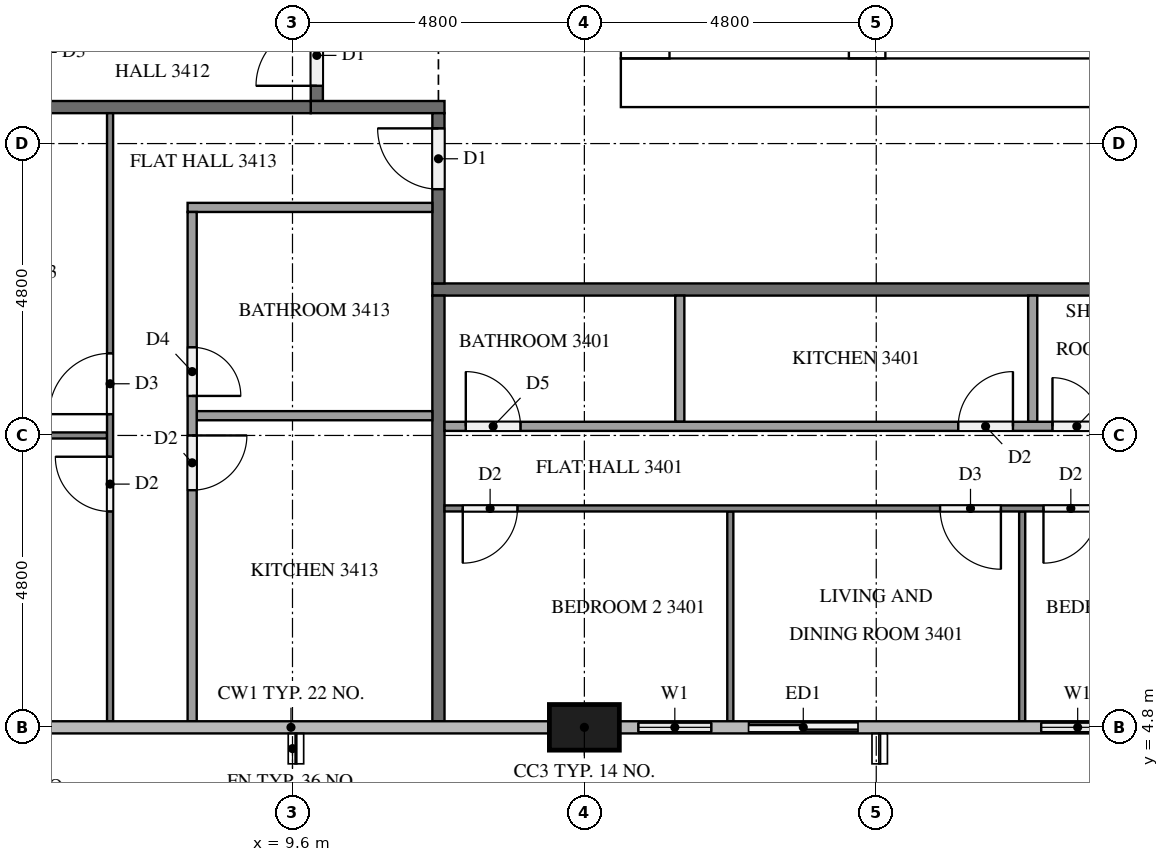
"""IFC4 building model, lengths in metres.
Left out: names, types, materials, properties, quantities, classifications, styles, units other than length and angle.
Written with IfcOpenShell. Run it as: python <this file> out.ifc"""

import sys

from ifc_helpers import new_model, si_unit, direction, frame, frame_2d, origin, origin_2d, place, context, subcontext, project, spatial, rectangle, extrude, element, fill, save


model = new_model("IFC4")
c1 = context("Model", 3, precision=1e-05, world=origin(), true_north=direction((0.0, 1.0)))
c2 = subcontext(c1, "Body", "Model", "MODEL_VIEW")
j1 = project(units=[si_unit("LENGTHUNIT", "METRE"), si_unit("PLANEANGLEUNIT", "RADIAN")], contexts=[c1])
p1 = place(None, origin())
s1 = spatial("IfcSite", under=j1, at=p1, CompositionType="ELEMENT")
p2 = place(p1, origin())
s2 = spatial("IfcBuilding", under=s1, at=p2, CompositionType="ELEMENT")
p3 = place(p2, frame((0.0, 0.0, 133.1)))
s3 = spatial("IfcBuildingStorey", under=s2, at=p3, CompositionType="ELEMENT", Elevation=133.1)
p4 = place(p3, frame((15.0, 15.4, 0.0), z_axis=(0.0, 0.0, 1.0), x_axis=(1.0, 0.0, 0.0)))
e1 = element("IfcWall", 1, at=p4, inside=s3, PredefinedType="SHEAR", context=c2, shape_type="SweptSolid", body=[
    extrude(rectangle(XDim=32.4, YDim=0.8, at=frame_2d((16.2, 0.0))), origin(), (0.0, 0.0, 1.0), 3.2),
])
p5 = place(p4, frame((15.3, 0.0, 0.0)))
e2 = element("IfcOpeningElement", 2, at=p5, cuts=e1, PredefinedType="OPENING", context=c2, shape_type="SweptSolid", body=[
    extrude(rectangle(XDim=1.8, YDim=2.1, at=frame_2d((0.9, 1.05))), frame((0.0, 0.41, 0.0), z_axis=(0.0, -1.0, 0.0), x_axis=(1.0, 0.0, 0.0)), (0.0, 0.0, 1.0), 0.82),
])
p6 = place(p3, frame((15.4, 15.8, 0.0), z_axis=(0.0, 0.0, 1.0), x_axis=(0.0, 1.0, 0.0)))
e3 = element("IfcWall", 3, at=p6, inside=s3, PredefinedType="SHEAR", context=c2, shape_type="SweptSolid", body=[
    extrude(rectangle(XDim=21.2, YDim=0.8, at=frame_2d((10.6, 0.0))), origin(), (0.0, 0.0, 1.0), 3.2),
])
p7 = place(p6, frame((4.96, 0.0, 0.0)))
e4 = element("IfcOpeningElement", 4, at=p7, cuts=e3, PredefinedType="OPENING", context=c2, shape_type="SweptSolid", body=[
    extrude(rectangle(XDim=1.2, YDim=2.1, at=frame_2d((0.6, 1.05))), frame((0.0, 0.41, 0.0), z_axis=(0.0, -1.0, 0.0), x_axis=(1.0, 0.0, 0.0)), (0.0, 0.0, 1.0), 0.82),
])
p8 = place(p3, frame((19.05, 15.8, 0.0), z_axis=(0.0, 0.0, 1.0), x_axis=(0.0, 1.0, 0.0)))
e5 = element("IfcWall", 5, at=p8, inside=s3, PredefinedType="SHEAR", context=c2, shape_type="SweptSolid", body=[
    extrude(rectangle(XDim=15.15, YDim=0.6, at=frame_2d((7.575, 0.0))), origin(), (0.0, 0.0, 1.0), 3.2),
])
p9 = place(p8, frame((9.65, 0.0, 0.0)))
e6 = element("IfcOpeningElement", 6, at=p9, cuts=e5, PredefinedType="OPENING", context=c2, shape_type="SweptSolid", body=[
    extrude(rectangle(XDim=1.1, YDim=2.1, at=frame_2d((0.55, 1.05))), frame((0.0, 0.31, 0.0), z_axis=(0.0, -1.0, 0.0), x_axis=(1.0, 0.0, 0.0)), (0.0, 0.0, 1.0), 0.62),
])
p10 = place(p8, frame((13.15, 0.0, 0.0)))
e7 = element("IfcOpeningElement", 7, at=p10, cuts=e5, PredefinedType="OPENING", context=c2, shape_type="SweptSolid", body=[
    extrude(rectangle(XDim=1.1, YDim=2.1, at=frame_2d((0.55, 1.05))), frame((0.0, 0.31, 0.0), z_axis=(0.0, -1.0, 0.0), x_axis=(1.0, 0.0, 0.0)), (0.0, 0.0, 1.0), 0.62),
])
p11 = place(p8, frame((0.4, 0.0, 0.0)))
e8 = element("IfcOpeningElement", 8, at=p11, cuts=e5, PredefinedType="OPENING", context=c2, shape_type="SweptSolid", body=[
    extrude(rectangle(XDim=1.2, YDim=2.1, at=frame_2d((0.6, 1.05))), frame((0.0, 0.31, 0.0), z_axis=(0.0, -1.0, 0.0), x_axis=(1.0, 0.0, 0.0)), (0.0, 0.0, 1.0), 0.62),
])
p12 = place(p3, frame((14.4, 4.8, 0.0), z_axis=(0.0, 0.0, 1.0), x_axis=(1.0, 0.0, 0.0)))
e9 = element("IfcColumn", 9, at=p12, inside=s3, PredefinedType="COLUMN", context=c2, shape_type="SweptSolid", body=[
    extrude(rectangle(XDim=1.15, YDim=0.75, at=origin_2d()), origin(), (0.0, 0.0, 1.0), 3.2),
])
p13 = place(p3, frame((14.975, 4.8, 0.0), z_axis=(0.0, 0.0, 1.0), x_axis=(1.0, 0.0, 0.0)))
e10 = element("IfcWall", 10, at=p13, inside=s3, PredefinedType="SOLIDWALL", context=c2, shape_type="SweptSolid", body=[
    extrude(rectangle(XDim=4.225, YDim=0.15, at=frame_2d((2.112, 0.0))), origin(), (0.0, 0.0, 1.0), 3.2),
])
p14 = place(p13, frame((0.312, 0.0, 0.9)))
e11 = element("IfcOpeningElement", 11, at=p14, cuts=e10, PredefinedType="OPENING", context=c2, shape_type="SweptSolid", body=[
    extrude(rectangle(XDim=1.2, YDim=1.4, at=frame_2d((0.6, 0.7))), frame((0.0, 0.085, 0.0), z_axis=(0.0, -1.0, 0.0), x_axis=(1.0, 0.0, 0.0)), (0.0, 0.0, 1.0), 0.17),
])
p15 = place(p13, frame((2.125, 0.0, 0.0)))
e12 = element("IfcOpeningElement", 12, at=p15, cuts=e10, PredefinedType="OPENING", context=c2, shape_type="SweptSolid", body=[
    extrude(rectangle(XDim=1.8, YDim=2.4, at=frame_2d((0.9, 1.2))), frame((0.0, 0.085, 0.0), z_axis=(0.0, -1.0, 0.0), x_axis=(1.0, 0.0, 0.0)), (0.0, 0.0, 1.0), 0.17),
])
p16 = place(p3, frame((21.6, 4.8, 0.0), z_axis=(0.0, 0.0, 1.0), x_axis=(1.0, 0.0, 0.0)))
e13 = element("IfcWall", 13, at=p16, inside=s3, PredefinedType="SOLIDWALL", context=c2, shape_type="SweptSolid", body=[
    extrude(rectangle(XDim=1.825, YDim=0.15, at=frame_2d((0.913, 0.0))), origin(), (0.0, 0.0, 1.0), 3.2),
])
p17 = place(p16, frame((0.312, 0.0, 0.9)))
e14 = element("IfcOpeningElement", 14, at=p17, cuts=e13, PredefinedType="OPENING", context=c2, shape_type="SweptSolid", body=[
    extrude(rectangle(XDim=1.2, YDim=1.4, at=frame_2d((0.6, 0.7))), frame((0.0, 0.085, 0.0), z_axis=(0.0, -1.0, 0.0), x_axis=(1.0, 0.0, 0.0)), (0.0, 0.0, 1.0), 0.17),
])
p18 = place(p3, frame((50.5, 12.0, 0.0), z_axis=(0.0, 0.0, 1.0), x_axis=(-1.0, 0.0, 0.0)))
e15 = element("IfcWall", 15, at=p18, inside=s3, PredefinedType="PARTITIONING", context=c2, shape_type="SweptSolid", body=[
    extrude(rectangle(XDim=38.6, YDim=0.2, at=frame_2d((19.3, 0.0))), origin(), (0.0, 0.0, 1.0), 3.2),
])
p19 = place(p18, frame((24.45, 0.0, 0.0)))
e16 = element("IfcOpeningElement", 16, at=p19, cuts=e15, PredefinedType="OPENING", context=c2, shape_type="SweptSolid", body=[
    extrude(rectangle(XDim=1.0, YDim=2.1, at=frame_2d((0.5, 1.05))), frame((0.0, 0.11, 0.0), z_axis=(0.0, -1.0, 0.0), x_axis=(1.0, 0.0, 0.0)), (0.0, 0.0, 1.0), 0.22),
])
p20 = place(p18, frame((10.05, 0.0, 0.0)))
e17 = element("IfcOpeningElement", 17, at=p20, cuts=e15, PredefinedType="OPENING", context=c2, shape_type="SweptSolid", body=[
    extrude(rectangle(XDim=1.0, YDim=2.1, at=frame_2d((0.5, 1.05))), frame((0.0, 0.11, 0.0), z_axis=(0.0, -1.0, 0.0), x_axis=(1.0, 0.0, 0.0)), (0.0, 0.0, 1.0), 0.22),
])
p21 = place(p18, frame((8.35, 0.0, 0.0)))
e18 = element("IfcOpeningElement", 18, at=p21, cuts=e15, PredefinedType="OPENING", context=c2, shape_type="SweptSolid", body=[
    extrude(rectangle(XDim=1.0, YDim=2.1, at=frame_2d((0.5, 1.05))), frame((0.0, 0.11, 0.0), z_axis=(0.0, -1.0, 0.0), x_axis=(1.0, 0.0, 0.0)), (0.0, 0.0, 1.0), 0.22),
])
p22 = place(p3, frame((10.0, 15.1, 0.0), z_axis=(0.0, 0.0, 1.0), x_axis=(0.0, 1.0, 0.0)))
e19 = element("IfcWall", 19, at=p22, inside=s3, PredefinedType="PARTITIONING", context=c2, shape_type="SweptSolid", body=[
    extrude(rectangle(XDim=22.6, YDim=0.2, at=frame_2d((11.3, 0.0))), origin(), (0.0, 0.0, 1.0), 3.2),
])
p23 = place(p22, frame((16.45, 0.0, 0.0)))
e20 = element("IfcOpeningElement", 20, at=p23, cuts=e19, PredefinedType="OPENING", context=c2, shape_type="SweptSolid", body=[
    extrude(rectangle(XDim=1.0, YDim=2.1, at=frame_2d((0.5, 1.05))), frame((0.0, 0.11, 0.0), z_axis=(0.0, -1.0, 0.0), x_axis=(1.0, 0.0, 0.0)), (0.0, 0.0, 1.0), 0.22),
])
p24 = place(p22, frame((0.25, 0.0, 0.0)))
e21 = element("IfcOpeningElement", 21, at=p24, cuts=e19, PredefinedType="OPENING", context=c2, shape_type="SweptSolid", body=[
    extrude(rectangle(XDim=1.0, YDim=2.1, at=frame_2d((0.5, 1.05))), frame((0.0, 0.11, 0.0), z_axis=(0.0, -1.0, 0.0), x_axis=(1.0, 0.0, 0.0)), (0.0, 0.0, 1.0), 0.22),
])
p25 = place(p3, frame((9.9, 15.0, 0.0), z_axis=(0.0, 0.0, 1.0), x_axis=(1.0, 0.0, 0.0)))
e22 = element("IfcWall", 22, at=p25, inside=s3, PredefinedType="PARTITIONING", context=c2, shape_type="SweptSolid", body=[
    extrude(rectangle(XDim=2.2, YDim=0.2, at=frame_2d((1.1, 0.0))), origin(), (0.0, 0.0, 1.0), 3.2),
])
p26 = place(p3, frame((12.0, 12.1, 0.0), z_axis=(0.0, 0.0, 1.0), x_axis=(0.0, 1.0, 0.0)))
e23 = element("IfcWall", 23, at=p26, inside=s3, PredefinedType="PARTITIONING", context=c2, shape_type="SweptSolid", body=[
    extrude(rectangle(XDim=2.8, YDim=0.2, at=frame_2d((1.4, 0.0))), origin(), (0.0, 0.0, 1.0), 3.2),
])
p27 = place(p26, frame((1.55, 0.0, 0.0)))
e24 = element("IfcOpeningElement", 24, at=p27, cuts=e23, PredefinedType="OPENING", context=c2, shape_type="SweptSolid", body=[
    extrude(rectangle(XDim=1.0, YDim=2.1, at=frame_2d((0.5, 1.05))), frame((0.0, 0.11, 0.0), z_axis=(0.0, -1.0, 0.0), x_axis=(1.0, 0.0, 0.0)), (0.0, 0.0, 1.0), 0.22),
])
p28 = place(p3, frame((12.0, 4.9, 0.0), z_axis=(0.0, 0.0, 1.0), x_axis=(0.0, 1.0, 0.0)))
e25 = element("IfcWall", 25, at=p28, inside=s3, PredefinedType="PARTITIONING", context=c2, shape_type="SweptSolid", body=[
    extrude(rectangle(XDim=7.0, YDim=0.2, at=frame_2d((3.5, 0.0))), origin(), (0.0, 0.0, 1.0), 3.2),
])
p29 = place(p3, frame((0.1, 15.0, 0.0), z_axis=(0.0, 0.0, 1.0), x_axis=(1.0, 0.0, 0.0)))
e26 = element("IfcWall", 26, at=p29, inside=s3, PredefinedType="PARTITIONING", context=c2, shape_type="SweptSolid", body=[
    extrude(rectangle(XDim=9.8, YDim=0.2, at=frame_2d((4.9, 0.0))), origin(), (0.0, 0.0, 1.0), 3.2),
])
for number, where, z_axis, x_axis in (
    (27, (21.6, 8.35, 0.0), (0.0, 0.0, 1.0), (0.0, -1.0, 0.0)),
    (28, (16.8, 8.35, 0.0), (0.0, 0.0, 1.0), (0.0, -1.0, 0.0)),
):
    element("IfcWall", number, at=place(p3, frame(where, z_axis=z_axis, x_axis=x_axis)), inside=s3, PredefinedType="PARTITIONING", context=c2, shape_type="SweptSolid", body=[
        extrude(rectangle(XDim=3.45, YDim=0.1, at=frame_2d((1.725, 0.0))), origin(), (0.0, 0.0, 1.0), 3.2),
    ])
p30 = place(p3, frame((26.3, 8.4, 0.0), z_axis=(0.0, 0.0, 1.0), x_axis=(-1.0, 0.0, 0.0)))
e29 = element("IfcWall", 29, at=p30, inside=s3, PredefinedType="PARTITIONING", context=c2, shape_type="SweptSolid", body=[
    extrude(rectangle(XDim=14.2, YDim=0.1, at=frame_2d((7.1, 0.0))), origin(), (0.0, 0.0, 1.0), 3.2),
])
p31 = place(p30, frame((3.45, 0.0, 0.0)))
e30 = element("IfcOpeningElement", 30, at=p31, cuts=e29, PredefinedType="OPENING", context=c2, shape_type="SweptSolid", body=[
    extrude(rectangle(XDim=0.9, YDim=2.1, at=frame_2d((0.45, 1.05))), frame((0.0, 0.06, 0.0), z_axis=(0.0, -1.0, 0.0), x_axis=(1.0, 0.0, 0.0)), (0.0, 0.0, 1.0), 0.12),
])
p32 = place(p30, frame((5.05, 0.0, 0.0)))
e31 = element("IfcOpeningElement", 31, at=p32, cuts=e29, PredefinedType="OPENING", context=c2, shape_type="SweptSolid", body=[
    extrude(rectangle(XDim=1.0, YDim=2.1, at=frame_2d((0.5, 1.05))), frame((0.0, 0.06, 0.0), z_axis=(0.0, -1.0, 0.0), x_axis=(1.0, 0.0, 0.0)), (0.0, 0.0, 1.0), 0.12),
])
p33 = place(p30, frame((13.0, 0.0, 0.0)))
e32 = element("IfcOpeningElement", 32, at=p33, cuts=e29, PredefinedType="OPENING", context=c2, shape_type="SweptSolid", body=[
    extrude(rectangle(XDim=0.9, YDim=2.1, at=frame_2d((0.45, 1.05))), frame((0.0, 0.06, 0.0), z_axis=(0.0, -1.0, 0.0), x_axis=(1.0, 0.0, 0.0)), (0.0, 0.0, 1.0), 0.12),
])
for number, where, z_axis, x_axis in (
    (33, (21.773, 11.9, 0.0), (0.0, 0.0, 1.0), (0.0, -1.0, 0.0)),
    (34, (15.969, 11.9, 0.0), (0.0, 0.0, 1.0), (0.0, -1.0, 0.0)),
):
    element("IfcWall", number, at=place(p3, frame(where, z_axis=z_axis, x_axis=x_axis)), inside=s3, PredefinedType="PARTITIONING", context=c2, shape_type="SweptSolid", body=[
        extrude(rectangle(XDim=2.075, YDim=0.15, at=frame_2d((1.038, 0.0))), origin(), (0.0, 0.0, 1.0), 3.2),
    ])
p34 = place(p3, frame((12.1, 9.75, 0.0), z_axis=(0.0, 0.0, 1.0), x_axis=(1.0, 0.0, 0.0)))
e35 = element("IfcWall", 35, at=p34, inside=s3, PredefinedType="PARTITIONING", context=c2, shape_type="SweptSolid", body=[
    extrude(rectangle(XDim=12.575, YDim=0.15, at=frame_2d((6.288, 0.0))), origin(), (0.0, 0.0, 1.0), 3.2),
])
p35 = place(p34, frame((9.998, 0.0, 0.0)))
e36 = element("IfcOpeningElement", 36, at=p35, cuts=e35, PredefinedType="OPENING", context=c2, shape_type="SweptSolid", body=[
    extrude(rectangle(XDim=0.8, YDim=2.1, at=frame_2d((0.4, 1.05))), frame((0.0, 0.085, 0.0), z_axis=(0.0, -1.0, 0.0), x_axis=(1.0, 0.0, 0.0)), (0.0, 0.0, 1.0), 0.17),
])
p36 = place(p34, frame((8.448, 0.0, 0.0)))
e37 = element("IfcOpeningElement", 37, at=p36, cuts=e35, PredefinedType="OPENING", context=c2, shape_type="SweptSolid", body=[
    extrude(rectangle(XDim=0.9, YDim=2.1, at=frame_2d((0.45, 1.05))), frame((0.0, 0.085, 0.0), z_axis=(0.0, -1.0, 0.0), x_axis=(1.0, 0.0, 0.0)), (0.0, 0.0, 1.0), 0.17),
])
p37 = place(p34, frame((0.35, 0.0, 0.0)))
e38 = element("IfcOpeningElement", 38, at=p37, cuts=e35, PredefinedType="OPENING", context=c2, shape_type="SweptSolid", body=[
    extrude(rectangle(XDim=0.9, YDim=2.1, at=frame_2d((0.45, 1.05))), frame((0.0, 0.085, 0.0), z_axis=(0.0, -1.0, 0.0), x_axis=(1.0, 0.0, 0.0)), (0.0, 0.0, 1.0), 0.17),
])
p38 = place(p3, frame((6.55, 9.6, 0.0), z_axis=(0.0, 0.0, 1.0), x_axis=(-1.0, 0.0, 0.0)))
e39 = element("IfcWall", 39, at=p38, inside=s3, PredefinedType="PARTITIONING", context=c2, shape_type="SweptSolid", body=[
    extrude(rectangle(XDim=6.025, YDim=0.1, at=frame_2d((3.013, 0.0))), origin(), (0.0, 0.0, 1.0), 3.2),
])
p39 = place(p3, frame((6.6, 4.9, 0.0), z_axis=(0.0, 0.0, 1.0), x_axis=(0.0, 1.0, 0.0)))
e40 = element("IfcWall", 40, at=p39, inside=s3, PredefinedType="PARTITIONING", context=c2, shape_type="SweptSolid", body=[
    extrude(rectangle(XDim=10.0, YDim=0.1, at=frame_2d((5.0, 0.0))), origin(), (0.0, 0.0, 1.0), 3.2),
])
p40 = place(p39, frame((5.05, 0.0, 0.0)))
e41 = element("IfcOpeningElement", 41, at=p40, cuts=e40, PredefinedType="OPENING", context=c2, shape_type="SweptSolid", body=[
    extrude(rectangle(XDim=1.0, YDim=2.1, at=frame_2d((0.5, 1.05))), frame((0.0, 0.06, 0.0), z_axis=(0.0, -1.0, 0.0), x_axis=(1.0, 0.0, 0.0)), (0.0, 0.0, 1.0), 0.12),
])
p41 = place(p39, frame((3.45, 0.0, 0.0)))
e42 = element("IfcOpeningElement", 42, at=p41, cuts=e40, PredefinedType="OPENING", context=c2, shape_type="SweptSolid", body=[
    extrude(rectangle(XDim=0.9, YDim=2.1, at=frame_2d((0.45, 1.05))), frame((0.0, 0.06, 0.0), z_axis=(0.0, -1.0, 0.0), x_axis=(1.0, 0.0, 0.0)), (0.0, 0.0, 1.0), 0.12),
])
p42 = place(p3, frame((11.9, 9.925, 0.0), z_axis=(0.0, 0.0, 1.0), x_axis=(-1.0, 0.0, 0.0)))
e43 = element("IfcWall", 43, at=p42, inside=s3, PredefinedType="PARTITIONING", context=c2, shape_type="SweptSolid", body=[
    extrude(rectangle(XDim=3.875, YDim=0.15, at=frame_2d((1.938, 0.0))), origin(), (0.0, 0.0, 1.0), 3.2),
])
p43 = place(p3, frame((11.9, 13.35, 0.0), z_axis=(0.0, 0.0, 1.0), x_axis=(-1.0, 0.0, 0.0)))
e44 = element("IfcWall", 44, at=p43, inside=s3, PredefinedType="PARTITIONING", context=c2, shape_type="SweptSolid", body=[
    extrude(rectangle(XDim=4.025, YDim=0.15, at=frame_2d((2.012, 0.0))), origin(), (0.0, 0.0, 1.0), 3.2),
])
p44 = place(p3, frame((7.95, 13.275, 0.0), z_axis=(0.0, 0.0, 1.0), x_axis=(0.0, -1.0, 0.0)))
e45 = element("IfcWall", 45, at=p44, inside=s3, PredefinedType="PARTITIONING", context=c2, shape_type="SweptSolid", body=[
    extrude(rectangle(XDim=8.375, YDim=0.15, at=frame_2d((4.188, 0.0))), origin(), (0.0, 0.0, 1.0), 3.2),
])
p45 = place(p44, frame((2.225, 0.0, 0.0)))
e46 = element("IfcOpeningElement", 46, at=p45, cuts=e45, PredefinedType="OPENING", context=c2, shape_type="SweptSolid", body=[
    extrude(rectangle(XDim=0.8, YDim=2.1, at=frame_2d((0.4, 1.05))), frame((0.0, 0.085, 0.0), z_axis=(0.0, -1.0, 0.0), x_axis=(1.0, 0.0, 0.0)), (0.0, 0.0, 1.0), 0.17),
])
p46 = place(p44, frame((3.675, 0.0, 0.0)))
e47 = element("IfcOpeningElement", 47, at=p46, cuts=e45, PredefinedType="OPENING", context=c2, shape_type="SweptSolid", body=[
    extrude(rectangle(XDim=0.9, YDim=2.1, at=frame_2d((0.45, 1.05))), frame((0.0, 0.085, 0.0), z_axis=(0.0, -1.0, 0.0), x_axis=(1.0, 0.0, 0.0)), (0.0, 0.0, 1.0), 0.17),
])
p47 = place(p14, origin())
e48 = element("IfcWindow", 48, at=p47, inside=s3, PartitioningType="SINGLE_PANEL", PredefinedType="WINDOW", context=c2, shape_type="SweptSolid", body=[
    extrude(rectangle(XDim=1.2, YDim=1.4, at=frame_2d((0.6, 0.7))), frame((0.0, 0.03, 0.0), z_axis=(0.0, -1.0, 0.0), x_axis=(1.0, 0.0, 0.0)), (0.0, 0.0, 1.0), 0.06),
])
fill(e11, e48)
p48 = place(p15, origin())
e49 = element("IfcDoor", 49, at=p48, inside=s3, OperationType="SLIDING_TO_LEFT", PredefinedType="DOOR", context=c2, shape_type="SweptSolid", body=[
    extrude(rectangle(XDim=1.8, YDim=2.4, at=frame_2d((0.9, 1.2))), frame((0.0, 0.025, 0.0), z_axis=(0.0, -1.0, 0.0), x_axis=(1.0, 0.0, 0.0)), (0.0, 0.0, 1.0), 0.05),
])
fill(e12, e49)
p49 = place(p17, origin())
e50 = element("IfcWindow", 50, at=p49, inside=s3, PartitioningType="SINGLE_PANEL", PredefinedType="WINDOW", context=c2, shape_type="SweptSolid", body=[
    extrude(rectangle(XDim=1.2, YDim=1.4, at=frame_2d((0.6, 0.7))), frame((0.0, 0.03, 0.0), z_axis=(0.0, -1.0, 0.0), x_axis=(1.0, 0.0, 0.0)), (0.0, 0.0, 1.0), 0.06),
])
fill(e14, e50)
p50 = place(p24, origin())
e51 = element("IfcDoor", 51, at=p50, inside=s3, OperationType="SINGLE_SWING_LEFT", PredefinedType="DOOR", context=c2, shape_type="SweptSolid", body=[
    extrude(rectangle(XDim=1.0, YDim=2.1, at=frame_2d((0.5, 1.05))), frame((0.0, 0.025, 0.0), z_axis=(0.0, -1.0, 0.0), x_axis=(1.0, 0.0, 0.0)), (0.0, 0.0, 1.0), 0.05),
])
fill(e21, e51)
p51 = place(p27, origin())
e52 = element("IfcDoor", 52, at=p51, inside=s3, OperationType="SINGLE_SWING_RIGHT", PredefinedType="DOOR", context=c2, shape_type="SweptSolid", body=[
    extrude(rectangle(XDim=1.0, YDim=2.1, at=frame_2d((0.5, 1.05))), frame((0.0, 0.025, 0.0), z_axis=(0.0, -1.0, 0.0), x_axis=(1.0, 0.0, 0.0)), (0.0, 0.0, 1.0), 0.05),
])
fill(e24, e52)
p52 = place(p31, origin())
e53 = element("IfcDoor", 53, at=p52, inside=s3, OperationType="SINGLE_SWING_RIGHT", PredefinedType="DOOR", context=c2, shape_type="SweptSolid", body=[
    extrude(rectangle(XDim=0.9, YDim=2.1, at=frame_2d((0.45, 1.05))), frame((0.0, 0.025, 0.0), z_axis=(0.0, -1.0, 0.0), x_axis=(1.0, 0.0, 0.0)), (0.0, 0.0, 1.0), 0.05),
])
fill(e30, e53)
p53 = place(p32, origin())
e54 = element("IfcDoor", 54, at=p53, inside=s3, OperationType="SINGLE_SWING_LEFT", PredefinedType="DOOR", context=c2, shape_type="SweptSolid", body=[
    extrude(rectangle(XDim=1.0, YDim=2.1, at=frame_2d((0.5, 1.05))), frame((0.0, 0.025, 0.0), z_axis=(0.0, -1.0, 0.0), x_axis=(1.0, 0.0, 0.0)), (0.0, 0.0, 1.0), 0.05),
])
fill(e31, e54)
p54 = place(p33, origin())
e55 = element("IfcDoor", 55, at=p54, inside=s3, OperationType="SINGLE_SWING_RIGHT", PredefinedType="DOOR", context=c2, shape_type="SweptSolid", body=[
    extrude(rectangle(XDim=0.9, YDim=2.1, at=frame_2d((0.45, 1.05))), frame((0.0, 0.025, 0.0), z_axis=(0.0, -1.0, 0.0), x_axis=(1.0, 0.0, 0.0)), (0.0, 0.0, 1.0), 0.05),
])
fill(e32, e55)
p55 = place(p35, origin())
e56 = element("IfcDoor", 56, at=p55, inside=s3, OperationType="SINGLE_SWING_LEFT", PredefinedType="DOOR", context=c2, shape_type="SweptSolid", body=[
    extrude(rectangle(XDim=0.8, YDim=2.1, at=frame_2d((0.4, 1.05))), frame((0.0, 0.025, 0.0), z_axis=(0.0, -1.0, 0.0), x_axis=(1.0, 0.0, 0.0)), (0.0, 0.0, 1.0), 0.05),
])
fill(e36, e56)
p56 = place(p36, origin())
e57 = element("IfcDoor", 57, at=p56, inside=s3, OperationType="SINGLE_SWING_RIGHT", PredefinedType="DOOR", context=c2, shape_type="SweptSolid", body=[
    extrude(rectangle(XDim=0.9, YDim=2.1, at=frame_2d((0.45, 1.05))), frame((0.0, 0.025, 0.0), z_axis=(0.0, -1.0, 0.0), x_axis=(1.0, 0.0, 0.0)), (0.0, 0.0, 1.0), 0.05),
])
fill(e37, e57)
p57 = place(p37, origin())
e58 = element("IfcDoor", 58, at=p57, inside=s3, OperationType="SINGLE_SWING_LEFT", PredefinedType="DOOR", context=c2, shape_type="SweptSolid", body=[
    extrude(rectangle(XDim=0.9, YDim=2.1, at=frame_2d((0.45, 1.05))), frame((0.0, 0.025, 0.0), z_axis=(0.0, -1.0, 0.0), x_axis=(1.0, 0.0, 0.0)), (0.0, 0.0, 1.0), 0.05),
])
fill(e38, e58)
p58 = place(p40, origin())
e59 = element("IfcDoor", 59, at=p58, inside=s3, OperationType="SINGLE_SWING_LEFT", PredefinedType="DOOR", context=c2, shape_type="SweptSolid", body=[
    extrude(rectangle(XDim=1.0, YDim=2.1, at=frame_2d((0.5, 1.05))), frame((0.0, 0.025, 0.0), z_axis=(0.0, -1.0, 0.0), x_axis=(1.0, 0.0, 0.0)), (0.0, 0.0, 1.0), 0.05),
])
fill(e41, e59)
p59 = place(p41, origin())
e60 = element("IfcDoor", 60, at=p59, inside=s3, OperationType="SINGLE_SWING_RIGHT", PredefinedType="DOOR", context=c2, shape_type="SweptSolid", body=[
    extrude(rectangle(XDim=0.9, YDim=2.1, at=frame_2d((0.45, 1.05))), frame((0.0, 0.025, 0.0), z_axis=(0.0, -1.0, 0.0), x_axis=(1.0, 0.0, 0.0)), (0.0, 0.0, 1.0), 0.05),
])
fill(e42, e60)
p60 = place(p45, origin())
e61 = element("IfcDoor", 61, at=p60, inside=s3, OperationType="SINGLE_SWING_RIGHT", PredefinedType="DOOR", context=c2, shape_type="SweptSolid", body=[
    extrude(rectangle(XDim=0.8, YDim=2.1, at=frame_2d((0.4, 1.05))), frame((0.0, 0.025, 0.0), z_axis=(0.0, -1.0, 0.0), x_axis=(1.0, 0.0, 0.0)), (0.0, 0.0, 1.0), 0.05),
])
fill(e46, e61)
p61 = place(p46, origin())
e62 = element("IfcDoor", 62, at=p61, inside=s3, OperationType="SINGLE_SWING_LEFT", PredefinedType="DOOR", context=c2, shape_type="SweptSolid", body=[
    extrude(rectangle(XDim=0.9, YDim=2.1, at=frame_2d((0.45, 1.05))), frame((0.0, 0.025, 0.0), z_axis=(0.0, -1.0, 0.0), x_axis=(1.0, 0.0, 0.0)), (0.0, 0.0, 1.0), 0.05),
])
fill(e47, e62)
save(model, sys.argv[1])
